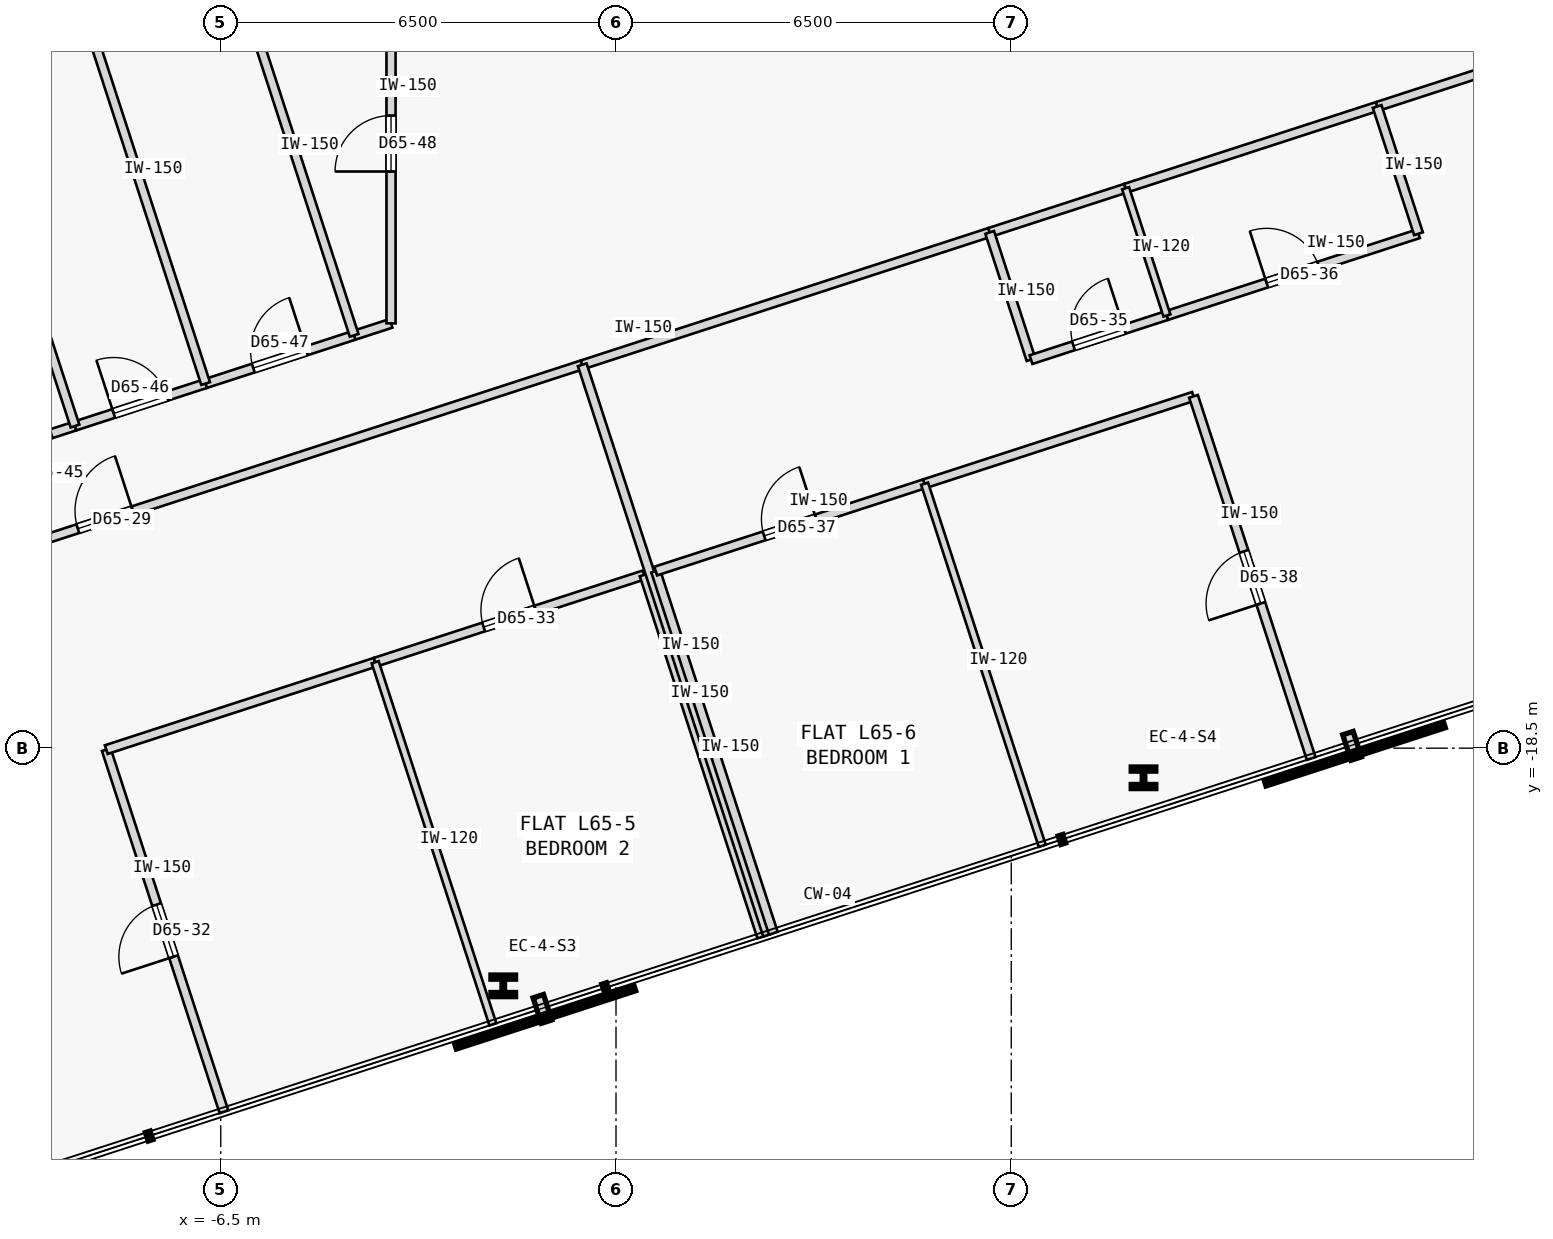
"""IFC4 building model, lengths in metres.
Left out: names, types, materials, properties, quantities, classifications, styles, units other than length and angle.
Written with IfcOpenShell. Run it as: python <this file> out.ifc"""

import sys

from ifc_helpers import new_model, si_unit, direction, frame, frame_2d, origin, origin_2d, place, context, subcontext, project, spatial, rectangle, i_section, extrude, element, fill, save


model = new_model("IFC4")
c1 = context("Model", 3, precision=1e-05, world=origin(), true_north=direction((0.0, 1.0)))
c2 = subcontext(c1, "Body", "Model", "MODEL_VIEW")
j1 = project(units=[si_unit("LENGTHUNIT", "METRE"), si_unit("PLANEANGLEUNIT", "RADIAN")], contexts=[c1])
p1 = place(None, origin())
s1 = spatial("IfcSite", under=j1, at=p1, CompositionType="ELEMENT")
p2 = place(p1, origin())
s2 = spatial("IfcBuilding", under=s1, at=p2, CompositionType="ELEMENT")
p3 = place(p2, frame((0.0, 0.0, 244.4)))
s3 = spatial("IfcBuildingStorey", under=s2, at=p3, CompositionType="ELEMENT", Elevation=244.4)
for number, where, z_axis, x_axis in (
    (1, (-1.854, -22.409, 0.0), (0.0, 0.0, 1.0), (1.0, 0.0, 0.0)),
    (2, (8.675, -18.988, 0.0), (0.0, 0.0, 1.0), (1.0, 0.0, 0.0)),
):
    element("IfcColumn", number, at=place(p3, frame(where, z_axis=z_axis, x_axis=x_axis)), inside=s3, PredefinedType="COLUMN", context=c2, shape_type="SweptSolid", body=[
        extrude(i_section(OverallWidth=0.405, OverallDepth=0.355, WebThickness=0.042, FlangeThickness=0.068, FilletRadius=0.015, at=origin_2d()), origin(), (0.0, 0.0, 1.0), 3.35),
    ])
p4 = place(p3, frame((-16.242, -17.292, 0.0), z_axis=(0.0, 0.0, 1.0), x_axis=(0.951056800106, 0.309016120894, 0.0)))
e3 = element("IfcWall", 3, at=p4, inside=s3, PredefinedType="PARTITIONING", context=c2, shape_type="SweptSolid", body=[
    extrude(rectangle(XDim=16.494, YDim=0.15, at=frame_2d((8.247, 0.0))), origin(), (0.0, 0.0, 1.0), 3.125),
])
p5 = place(p4, frame((7.772, 0.0, 0.0)))
e4 = element("IfcOpeningElement", 4, at=p5, cuts=e3, PredefinedType="OPENING", context=c2, shape_type="SweptSolid", body=[
    extrude(rectangle(XDim=0.95, YDim=2.15, at=frame_2d((0.475, 1.075))), frame((0.0, 0.085, 0.0), z_axis=(0.0, -1.0, 0.0), x_axis=(1.0, 0.0, 0.0)), (0.0, 0.0, 1.0), 0.17),
])
p6 = place(p3, frame((-0.555, -12.195, 0.0), z_axis=(0.0, 0.0, 1.0), x_axis=(0.951057495482, 0.309013980732, 0.0)))
e5 = element("IfcWall", 5, at=p6, inside=s3, PredefinedType="PARTITIONING", context=c2, shape_type="SweptSolid", body=[
    extrude(rectangle(XDim=7.045, YDim=0.15, at=frame_2d((3.522, 0.0))), origin(), (0.0, 0.0, 1.0), 3.125),
])
p7 = place(p3, frame((12.517, -7.948, 0.0), z_axis=(0.0, 0.0, 1.0), x_axis=(0.951053764264, 0.309025464128, 0.0)))
e6 = element("IfcWall", 6, at=p7, inside=s3, PredefinedType="PARTITIONING", context=c2, shape_type="SweptSolid", body=[
    extrude(rectangle(XDim=18.399, YDim=0.15, at=frame_2d((9.2, 0.0))), origin(), (0.0, 0.0, 1.0), 3.125),
])
p8 = place(p7, frame((8.725, 0.0, 0.0)))
e7 = element("IfcOpeningElement", 7, at=p8, cuts=e6, PredefinedType="OPENING", context=c2, shape_type="SweptSolid", body=[
    extrude(rectangle(XDim=0.95, YDim=2.15, at=frame_2d((0.475, 1.075))), frame((0.0, 0.085, 0.0), z_axis=(0.0, -1.0, 0.0), x_axis=(1.0, 0.0, 0.0)), (0.0, 0.0, 1.0), 0.17),
])
p9 = place(p3, frame((6.145, -10.018, 0.0), z_axis=(0.0, 0.0, 1.0), x_axis=(0.951035595692, 0.309081373955, 0.0)))
e8 = element("IfcWall", 8, at=p9, inside=s3, PredefinedType="PARTITIONING", context=c2, shape_type="SweptSolid", body=[
    extrude(rectangle(XDim=2.35, YDim=0.15, at=frame_2d((1.175, 0.0))), origin(), (0.0, 0.0, 1.0), 3.125),
])
p10 = place(p3, frame((8.38, -9.292, 0.0), z_axis=(0.0, 0.0, 1.0), x_axis=(0.951074479912, 0.30896170258, 0.0)))
e9 = element("IfcWall", 9, at=p10, inside=s3, PredefinedType="PARTITIONING", context=c2, shape_type="SweptSolid", body=[
    extrude(rectangle(XDim=4.35, YDim=0.15, at=frame_2d((2.175, 0.0))), origin(), (0.0, 0.0, 1.0), 3.125),
])
p11 = place(p3, frame((-10.558, -13.742, 0.0), z_axis=(0.0, 0.0, 1.0), x_axis=(0.951060780507, 0.309003870173, 0.0)))
e10 = element("IfcWall", 10, at=p11, inside=s3, PredefinedType="PARTITIONING", context=c2, shape_type="SweptSolid", body=[
    extrude(rectangle(XDim=1.746, YDim=0.15, at=frame_2d((0.873, 0.0))), origin(), (0.0, 0.0, 1.0), 3.125),
])
p12 = place(p11, frame((0.413, 0.0, 0.0)))
e11 = element("IfcOpeningElement", 11, at=p12, cuts=e10, PredefinedType="OPENING", context=c2, shape_type="SweptSolid", body=[
    extrude(rectangle(XDim=0.92, YDim=2.15, at=frame_2d((0.46, 1.075))), frame((0.0, 0.085, 0.0), z_axis=(0.0, -1.0, 0.0), x_axis=(1.0, 0.0, 0.0)), (0.0, 0.0, 1.0), 0.17),
])
p13 = place(p3, frame((-8.897, -13.202, 0.0), z_axis=(0.0, 0.0, 1.0), x_axis=(0.951065832698, 0.308988319964, 0.0)))
e12 = element("IfcWall", 12, at=p13, inside=s3, PredefinedType="PARTITIONING", context=c2, shape_type="SweptSolid", body=[
    extrude(rectangle(XDim=2.259, YDim=0.15, at=frame_2d((1.129, 0.0))), origin(), (0.0, 0.0, 1.0), 3.125),
])
p14 = place(p13, frame((0.669, 0.0, 0.0)))
e13 = element("IfcOpeningElement", 13, at=p14, cuts=e12, PredefinedType="OPENING", context=c2, shape_type="SweptSolid", body=[
    extrude(rectangle(XDim=0.92, YDim=2.15, at=frame_2d((0.46, 1.075))), frame((0.0, 0.085, 0.0), z_axis=(0.0, -1.0, 0.0), x_axis=(1.0, 0.0, 0.0)), (0.0, 0.0, 1.0), 0.17),
])
p15 = place(p3, frame((-6.749, -12.504, 0.0), z_axis=(0.0, 0.0, 1.0), x_axis=(0.951042451835, 0.309060276981, 0.0)))
e14 = element("IfcWall", 14, at=p15, inside=s3, PredefinedType="PARTITIONING", context=c2, shape_type="SweptSolid", body=[
    extrude(rectangle(XDim=2.568, YDim=0.15, at=frame_2d((1.284, 0.0))), origin(), (0.0, 0.0, 1.0), 3.125),
])
p16 = place(p15, frame((0.824, 0.0, 0.0)))
e15 = element("IfcOpeningElement", 15, at=p16, cuts=e14, PredefinedType="OPENING", context=c2, shape_type="SweptSolid", body=[
    extrude(rectangle(XDim=0.92, YDim=2.15, at=frame_2d((0.46, 1.075))), frame((0.0, 0.085, 0.0), z_axis=(0.0, -1.0, 0.0), x_axis=(1.0, 0.0, 0.0)), (0.0, 0.0, 1.0), 0.17),
])
p17 = place(p3, frame((-4.306, -11.711, 0.0), z_axis=(0.0, 0.0, 1.0), x_axis=(0.95110436063, 0.308869705847, 0.0)))
e16 = element("IfcWall", 16, at=p17, inside=s3, PredefinedType="PARTITIONING", context=c2, shape_type="SweptSolid", body=[
    extrude(rectangle(XDim=0.638, YDim=0.15, at=frame_2d((0.319, 0.0))), origin(), (0.0, 0.0, 1.0), 3.125),
])
p18 = place(p3, frame((-3.7, -11.514, 0.0), z_axis=(0.0, 0.0, 1.0), x_axis=(-8.2572974e-05, 0.999999996591, 0.0)))
e17 = element("IfcWall", 17, at=p18, inside=s3, PredefinedType="PARTITIONING", context=c2, shape_type="SweptSolid", body=[
    extrude(rectangle(XDim=5.913, YDim=0.15, at=frame_2d((2.957, 0.0))), origin(), (0.0, 0.0, 1.0), 3.125),
])
p19 = place(p18, frame((2.497, 0.0, 0.0)))
e18 = element("IfcOpeningElement", 18, at=p19, cuts=e17, PredefinedType="OPENING", context=c2, shape_type="SweptSolid", body=[
    extrude(rectangle(XDim=0.92, YDim=2.15, at=frame_2d((0.46, 1.075))), frame((0.0, 0.085, 0.0), z_axis=(0.0, -1.0, 0.0), x_axis=(1.0, 0.0, 0.0)), (0.0, 0.0, 1.0), 0.17),
])
p20 = place(p3, frame((-6.448, -24.479, 0.0), z_axis=(0.0, 0.0, 1.0), x_axis=(-0.309049046683, 0.951046101272, 0.0)))
e19 = element("IfcWall", 19, at=p20, inside=s3, PredefinedType="PARTITIONING", context=c2, shape_type="SweptSolid", body=[
    extrude(rectangle(XDim=6.262, YDim=0.15, at=frame_2d((3.131, 0.0))), origin(), (0.0, 0.0, 1.0), 3.125),
])
p21 = place(p20, frame((2.681, 0.0, 0.0)))
e20 = element("IfcOpeningElement", 20, at=p21, cuts=e19, PredefinedType="OPENING", context=c2, shape_type="SweptSolid", body=[
    extrude(rectangle(XDim=0.9, YDim=2.15, at=frame_2d((0.45, 1.075))), frame((0.0, 0.085, 0.0), z_axis=(0.0, -1.0, 0.0), x_axis=(1.0, 0.0, 0.0)), (0.0, 0.0, 1.0), 0.17),
])
p22 = place(p3, frame((-8.383, -18.524, 0.0), z_axis=(0.0, 0.0, 1.0), x_axis=(0.951055286502, 0.309020779263, 0.0)))
e21 = element("IfcWall", 21, at=p22, inside=s3, PredefinedType="PARTITIONING", context=c2, shape_type="SweptSolid", body=[
    extrude(rectangle(XDim=4.65, YDim=0.15, at=frame_2d((2.325, 0.0))), origin(), (0.0, 0.0, 1.0), 3.125),
])
p23 = place(p3, frame((-3.96, -17.087, 0.0), z_axis=(0.0, 0.0, 1.0), x_axis=(0.951050272606, 0.309036209813, 0.0)))
e22 = element("IfcWall", 22, at=p23, inside=s3, PredefinedType="PARTITIONING", context=c2, shape_type="SweptSolid", body=[
    extrude(rectangle(XDim=4.65, YDim=0.15, at=frame_2d((2.325, 0.0))), origin(), (0.0, 0.0, 1.0), 3.125),
])
p24 = place(p23, frame((1.875, 0.0, 0.0)))
e23 = element("IfcOpeningElement", 23, at=p24, cuts=e22, PredefinedType="OPENING", context=c2, shape_type="SweptSolid", body=[
    extrude(rectangle(XDim=0.9, YDim=2.15, at=frame_2d((0.45, 1.075))), frame((0.0, 0.085, 0.0), z_axis=(0.0, -1.0, 0.0), x_axis=(1.0, 0.0, 0.0)), (0.0, 0.0, 1.0), 0.17),
])
p25 = place(p3, frame((2.397, -21.605, 0.0), z_axis=(0.0, 0.0, 1.0), x_axis=(-0.309013782848, 0.951057559777, 0.0)))
e24 = element("IfcWall", 24, at=p25, inside=s3, PredefinedType="PARTITIONING", context=c2, shape_type="SweptSolid", body=[
    extrude(rectangle(XDim=6.262, YDim=0.15, at=frame_2d((3.131, 0.0))), origin(), (0.0, 0.0, 1.0), 3.125),
])
p26 = place(p3, frame((2.492, -21.575, 0.0), z_axis=(0.0, 0.0, 1.0), x_axis=(-0.308999867152, 0.951062081097, 0.0)))
e25 = element("IfcWall", 25, at=p26, inside=s3, PredefinedType="PARTITIONING", context=c2, shape_type="SweptSolid", body=[
    extrude(rectangle(XDim=9.862, YDim=0.15, at=frame_2d((4.931, 0.0))), origin(), (0.0, 0.0, 1.0), 3.125),
])
p27 = place(p3, frame((-2.025, -23.042, 0.0), z_axis=(0.0, 0.0, 1.0), x_axis=(-0.309013782848, 0.951057559777, 0.0)))
e26 = element("IfcWall", 26, at=p27, inside=s3, PredefinedType="PARTITIONING", context=c2, shape_type="SweptSolid", body=[
    extrude(rectangle(XDim=6.262, YDim=0.12, at=frame_2d((3.131, 0.0))), origin(), (0.0, 0.0, 1.0), 3.125),
])
p28 = place(p3, frame((6.825, -12.111, 0.0), z_axis=(0.0, 0.0, 1.0), x_axis=(-0.308960600764, 0.951074837842, 0.0)))
e27 = element("IfcWall", 27, at=p28, inside=s3, PredefinedType="PARTITIONING", context=c2, shape_type="SweptSolid", body=[
    extrude(rectangle(XDim=2.2, YDim=0.15, at=frame_2d((1.1, 0.0))), origin(), (0.0, 0.0, 1.0), 3.125),
])
p29 = place(p3, frame((6.825, -12.111, 0.0), z_axis=(0.0, 0.0, 1.0), x_axis=(0.951076048914, 0.308956872689, 0.0)))
e28 = element("IfcWall", 28, at=p29, inside=s3, PredefinedType="PARTITIONING", context=c2, shape_type="SweptSolid", body=[
    extrude(rectangle(XDim=2.35, YDim=0.15, at=frame_2d((1.175, 0.0))), origin(), (0.0, 0.0, 1.0), 3.125),
])
p30 = place(p29, frame((0.735, 0.0, 0.0)))
e29 = element("IfcOpeningElement", 29, at=p30, cuts=e28, PredefinedType="OPENING", context=c2, shape_type="SweptSolid", body=[
    extrude(rectangle(XDim=0.88, YDim=2.15, at=frame_2d((0.44, 1.075))), frame((0.0, 0.085, 0.0), z_axis=(0.0, -1.0, 0.0), x_axis=(1.0, 0.0, 0.0)), (0.0, 0.0, 1.0), 0.17),
])
p31 = place(p3, frame((9.06, -11.385, 0.0), z_axis=(0.0, 0.0, 1.0), x_axis=(0.951057987102, 0.309012467661, 0.0)))
e30 = element("IfcWall", 30, at=p31, inside=s3, PredefinedType="PARTITIONING", context=c2, shape_type="SweptSolid", body=[
    extrude(rectangle(XDim=4.35, YDim=0.15, at=frame_2d((2.175, 0.0))), origin(), (0.0, 0.0, 1.0), 3.125),
])
p32 = place(p31, frame((1.725, 0.0, 0.0)))
e31 = element("IfcOpeningElement", 31, at=p32, cuts=e30, PredefinedType="OPENING", context=c2, shape_type="SweptSolid", body=[
    extrude(rectangle(XDim=0.9, YDim=2.15, at=frame_2d((0.45, 1.075))), frame((0.0, 0.085, 0.0), z_axis=(0.0, -1.0, 0.0), x_axis=(1.0, 0.0, 0.0)), (0.0, 0.0, 1.0), 0.17),
])
p33 = place(p3, frame((13.197, -10.04, 0.0), z_axis=(0.0, 0.0, 1.0), x_axis=(-0.309060979314, 0.951042223598, 0.0)))
e32 = element("IfcWall", 32, at=p33, inside=s3, PredefinedType="PARTITIONING", context=c2, shape_type="SweptSolid", body=[
    extrude(rectangle(XDim=2.2, YDim=0.15, at=frame_2d((1.1, 0.0))), origin(), (0.0, 0.0, 1.0), 3.125),
])
p34 = place(p3, frame((2.587, -21.544, 0.0), z_axis=(0.0, 0.0, 1.0), x_axis=(-0.309013782848, 0.951057559777, 0.0)))
e33 = element("IfcWall", 33, at=p34, inside=s3, PredefinedType="PARTITIONING", context=c2, shape_type="SweptSolid", body=[
    extrude(rectangle(XDim=6.262, YDim=0.15, at=frame_2d((3.131, 0.0))), origin(), (0.0, 0.0, 1.0), 3.125),
])
p35 = place(p3, frame((0.652, -15.588, 0.0), z_axis=(0.0, 0.0, 1.0), x_axis=(0.951065702951, 0.308988719326, 0.0)))
e34 = element("IfcWall", 34, at=p35, inside=s3, PredefinedType="PARTITIONING", context=c2, shape_type="SweptSolid", body=[
    extrude(rectangle(XDim=4.65, YDim=0.15, at=frame_2d((2.325, 0.0))), origin(), (0.0, 0.0, 1.0), 3.125),
])
p36 = place(p35, frame((1.875, 0.0, 0.0)))
e35 = element("IfcOpeningElement", 35, at=p36, cuts=e34, PredefinedType="OPENING", context=c2, shape_type="SweptSolid", body=[
    extrude(rectangle(XDim=0.9, YDim=2.15, at=frame_2d((0.45, 1.075))), frame((0.0, 0.085, 0.0), z_axis=(0.0, -1.0, 0.0), x_axis=(1.0, 0.0, 0.0)), (0.0, 0.0, 1.0), 0.17),
])
p37 = place(p3, frame((5.075, -14.151, 0.0), z_axis=(0.0, 0.0, 1.0), x_axis=(0.951055286502, 0.309020779263, 0.0)))
e36 = element("IfcWall", 36, at=p37, inside=s3, PredefinedType="PARTITIONING", context=c2, shape_type="SweptSolid", body=[
    extrude(rectangle(XDim=4.65, YDim=0.15, at=frame_2d((2.325, 0.0))), origin(), (0.0, 0.0, 1.0), 3.125),
])
p38 = place(p3, frame((11.432, -18.67, 0.0), z_axis=(0.0, 0.0, 1.0), x_axis=(-0.309013782848, 0.951057559777, 0.0)))
e37 = element("IfcWall", 37, at=p38, inside=s3, PredefinedType="PARTITIONING", context=c2, shape_type="SweptSolid", body=[
    extrude(rectangle(XDim=6.262, YDim=0.15, at=frame_2d((3.131, 0.0))), origin(), (0.0, 0.0, 1.0), 3.125),
])
p39 = place(p38, frame((2.681, 0.0, 0.0)))
e38 = element("IfcOpeningElement", 38, at=p39, cuts=e37, PredefinedType="OPENING", context=c2, shape_type="SweptSolid", body=[
    extrude(rectangle(XDim=0.9, YDim=2.15, at=frame_2d((0.45, 1.075))), frame((0.0, 0.085, 0.0), z_axis=(0.0, -1.0, 0.0), x_axis=(1.0, 0.0, 0.0)), (0.0, 0.0, 1.0), 0.17),
])
p40 = place(p3, frame((9.06, -11.385, 0.0), z_axis=(0.0, 0.0, 1.0), x_axis=(-0.309028364152, 0.951052821956, 0.0)))
e39 = element("IfcWall", 39, at=p40, inside=s3, PredefinedType="PARTITIONING", context=c2, shape_type="SweptSolid", body=[
    extrude(rectangle(XDim=2.2, YDim=0.12, at=frame_2d((1.1, 0.0))), origin(), (0.0, 0.0, 1.0), 3.125),
])
p41 = place(p3, frame((7.01, -20.107, 0.0), z_axis=(0.0, 0.0, 1.0), x_axis=(-0.30902524124, 0.951053836687, 0.0)))
e40 = element("IfcWall", 40, at=p41, inside=s3, PredefinedType="PARTITIONING", context=c2, shape_type="SweptSolid", body=[
    extrude(rectangle(XDim=6.262, YDim=0.12, at=frame_2d((3.131, 0.0))), origin(), (0.0, 0.0, 1.0), 3.125),
])
p42 = place(p3, frame((-8.897, -13.202, 0.0), z_axis=(0.0, 0.0, 1.0), x_axis=(-0.309008036968, 0.951059426687, 0.0)))
e41 = element("IfcWall", 41, at=p42, inside=s3, PredefinedType="PARTITIONING", context=c2, shape_type="SweptSolid", body=[
    extrude(rectangle(XDim=7.994, YDim=0.15, at=frame_2d((3.997, 0.0))), origin(), (0.0, 0.0, 1.0), 3.125),
])
p43 = place(p3, frame((-6.749, -12.504, 0.0), z_axis=(0.0, 0.0, 1.0), x_axis=(-0.309005471061, 0.95106026037, 0.0)))
e42 = element("IfcWall", 42, at=p43, inside=s3, PredefinedType="PARTITIONING", context=c2, shape_type="SweptSolid", body=[
    extrude(rectangle(XDim=7.26, YDim=0.15, at=frame_2d((3.63, 0.0))), origin(), (0.0, 0.0, 1.0), 3.125),
])
p44 = place(p3, frame((-4.306, -11.711, 0.0), z_axis=(0.0, 0.0, 1.0), x_axis=(-0.309048266124, 0.951046354919, 0.0)))
e43 = element("IfcWall", 43, at=p44, inside=s3, PredefinedType="PARTITIONING", context=c2, shape_type="SweptSolid", body=[
    extrude(rectangle(XDim=6.425, YDim=0.15, at=frame_2d((3.212, 0.0))), origin(), (0.0, 0.0, 1.0), 3.125),
])
p45 = place(p5, origin())
e44 = element("IfcDoor", 44, at=p45, inside=s3, OperationType="SINGLE_SWING_RIGHT", PredefinedType="DOOR", context=c2, shape_type="SweptSolid", body=[
    extrude(rectangle(XDim=0.95, YDim=2.15, at=frame_2d((0.475, 1.075))), frame((0.0, 0.025, 0.0), z_axis=(0.0, -1.0, 0.0), x_axis=(1.0, 0.0, 0.0)), (0.0, 0.0, 1.0), 0.05),
])
fill(e4, e44)
p46 = place(p21, origin())
e45 = element("IfcDoor", 45, at=p46, inside=s3, OperationType="SINGLE_SWING_LEFT", PredefinedType="DOOR", context=c2, shape_type="SweptSolid", body=[
    extrude(rectangle(XDim=0.9, YDim=2.15, at=frame_2d((0.45, 1.075))), frame((0.0, 0.025, 0.0), z_axis=(0.0, -1.0, 0.0), x_axis=(1.0, 0.0, 0.0)), (0.0, 0.0, 1.0), 0.05),
])
fill(e20, e45)
p47 = place(p24, origin())
e46 = element("IfcDoor", 46, at=p47, inside=s3, OperationType="SINGLE_SWING_RIGHT", PredefinedType="DOOR", context=c2, shape_type="SweptSolid", body=[
    extrude(rectangle(XDim=0.9, YDim=2.15, at=frame_2d((0.45, 1.075))), frame((0.0, 0.025, 0.0), z_axis=(0.0, -1.0, 0.0), x_axis=(1.0, 0.0, 0.0)), (0.0, 0.0, 1.0), 0.05),
])
fill(e23, e46)
p48 = place(p30, origin())
e47 = element("IfcDoor", 47, at=p48, inside=s3, OperationType="SINGLE_SWING_RIGHT", PredefinedType="DOOR", context=c2, shape_type="SweptSolid", body=[
    extrude(rectangle(XDim=0.88, YDim=2.15, at=frame_2d((0.44, 1.075))), frame((0.0, 0.025, 0.0), z_axis=(0.0, -1.0, 0.0), x_axis=(1.0, 0.0, 0.0)), (0.0, 0.0, 1.0), 0.05),
])
fill(e29, e47)
p49 = place(p32, origin())
e48 = element("IfcDoor", 48, at=p49, inside=s3, OperationType="SINGLE_SWING_LEFT", PredefinedType="DOOR", context=c2, shape_type="SweptSolid", body=[
    extrude(rectangle(XDim=0.9, YDim=2.15, at=frame_2d((0.45, 1.075))), frame((0.0, 0.025, 0.0), z_axis=(0.0, -1.0, 0.0), x_axis=(1.0, 0.0, 0.0)), (0.0, 0.0, 1.0), 0.05),
])
fill(e31, e48)
p50 = place(p36, origin())
e49 = element("IfcDoor", 49, at=p50, inside=s3, OperationType="SINGLE_SWING_RIGHT", PredefinedType="DOOR", context=c2, shape_type="SweptSolid", body=[
    extrude(rectangle(XDim=0.9, YDim=2.15, at=frame_2d((0.45, 1.075))), frame((0.0, 0.025, 0.0), z_axis=(0.0, -1.0, 0.0), x_axis=(1.0, 0.0, 0.0)), (0.0, 0.0, 1.0), 0.05),
])
fill(e35, e49)
p51 = place(p39, origin())
e50 = element("IfcDoor", 50, at=p51, inside=s3, OperationType="SINGLE_SWING_LEFT", PredefinedType="DOOR", context=c2, shape_type="SweptSolid", body=[
    extrude(rectangle(XDim=0.9, YDim=2.15, at=frame_2d((0.45, 1.075))), frame((0.0, 0.025, 0.0), z_axis=(0.0, -1.0, 0.0), x_axis=(1.0, 0.0, 0.0)), (0.0, 0.0, 1.0), 0.05),
])
fill(e38, e50)
p52 = place(p14, origin())
e51 = element("IfcDoor", 51, at=p52, inside=s3, OperationType="SINGLE_SWING_LEFT", PredefinedType="DOOR", context=c2, shape_type="SweptSolid", body=[
    extrude(rectangle(XDim=0.92, YDim=2.15, at=frame_2d((0.46, 1.075))), frame((0.0, 0.025, 0.0), z_axis=(0.0, -1.0, 0.0), x_axis=(1.0, 0.0, 0.0)), (0.0, 0.0, 1.0), 0.05),
])
fill(e13, e51)
p53 = place(p16, origin())
e52 = element("IfcDoor", 52, at=p53, inside=s3, OperationType="SINGLE_SWING_RIGHT", PredefinedType="DOOR", context=c2, shape_type="SweptSolid", body=[
    extrude(rectangle(XDim=0.92, YDim=2.15, at=frame_2d((0.46, 1.075))), frame((0.0, 0.025, 0.0), z_axis=(0.0, -1.0, 0.0), x_axis=(1.0, 0.0, 0.0)), (0.0, 0.0, 1.0), 0.05),
])
fill(e15, e52)
p54 = place(p19, origin())
e53 = element("IfcDoor", 53, at=p54, inside=s3, OperationType="SINGLE_SWING_LEFT", PredefinedType="DOOR", context=c2, shape_type="SweptSolid", body=[
    extrude(rectangle(XDim=0.92, YDim=2.15, at=frame_2d((0.46, 1.075))), frame((0.0, 0.025, 0.0), z_axis=(0.0, -1.0, 0.0), x_axis=(1.0, 0.0, 0.0)), (0.0, 0.0, 1.0), 0.05),
])
fill(e18, e53)
save(model, sys.argv[1])
